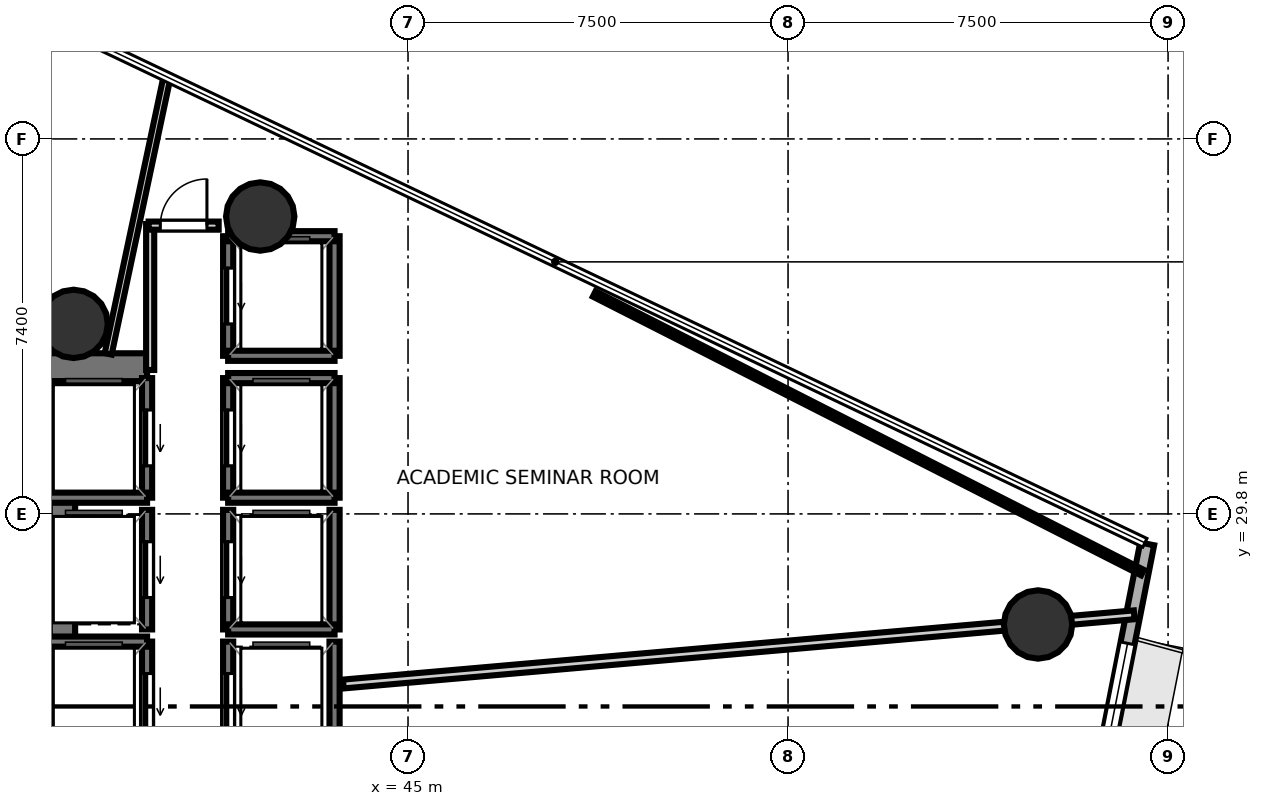
"""IFC4 building model, lengths in metres.
Left out: names, types, materials, properties, quantities, classifications, styles, units other than length and angle.
Written with IfcOpenShell. Run it as: python <this file> out.ifc"""

import sys

from ifc_helpers import new_model, si_unit, direction, frame, frame_2d, origin, origin_2d, place, context, subcontext, project, spatial, rectangle, hollow_circle, extrude, element, fill, save


model = new_model("IFC4")
c1 = context("Model", 3, precision=1e-05, world=origin(), true_north=direction((0.0, 1.0)))
c2 = subcontext(c1, "Body", "Model", "MODEL_VIEW")
j1 = project(units=[si_unit("LENGTHUNIT", "METRE"), si_unit("PLANEANGLEUNIT", "RADIAN")], contexts=[c1])
p1 = place(None, origin())
s1 = spatial("IfcSite", under=j1, at=p1, CompositionType="ELEMENT")
p2 = place(p1, origin())
s2 = spatial("IfcBuilding", under=s1, at=p2, CompositionType="ELEMENT")
p3 = place(p2, frame((0.0, 0.0, 143.1)))
s3 = spatial("IfcBuildingStorey", under=s2, at=p3, CompositionType="ELEMENT", Elevation=143.1)
p4 = place(p3, frame((29.23, 32.695, 0.0), z_axis=(0.0, 0.0, 1.0), x_axis=(1.0, 0.0, 0.0)))
e1 = element("IfcWall", 1, at=p4, inside=s3, PredefinedType="SHEAR", context=c2, shape_type="SweptSolid", body=[
    extrude(rectangle(XDim=10.62, YDim=0.55, at=frame_2d((5.31, 0.0))), origin(), (0.0, 0.0, 1.0), 4.32),
])
p5 = place(p4, frame((0.995, 0.0, 0.0)))
e2 = element("IfcOpeningElement", 2, at=p5, cuts=e1, PredefinedType="OPENING", context=c2, shape_type="SweptSolid", body=[
    extrude(rectangle(XDim=1.25, YDim=2.15, at=frame_2d((0.625, 1.075))), frame((0.0, 0.285, 0.0), z_axis=(0.0, -1.0, 0.0), x_axis=(1.0, 0.0, 0.0)), (0.0, 0.0, 1.0), 0.57),
])
p6 = place(p3, frame((38.18, 24.98, 0.0), z_axis=(0.0, 0.0, 1.0), x_axis=(0.0, 1.0, 0.0)))
e3 = element("IfcWall", 3, at=p6, inside=s3, PredefinedType="SHEAR", context=c2, shape_type="SweptSolid", body=[
    extrude(rectangle(XDim=7.44, YDim=0.5, at=frame_2d((3.72, 0.0))), origin(), (0.0, 0.0, 1.0), 4.32),
])
p7 = place(p3, frame((38.4, 33.55, 0.0), z_axis=(0.0, 0.0, 1.0), x_axis=(1.0, 0.0, 0.0)))
e4 = element("IfcColumn", 4, at=p7, inside=s3, PredefinedType="COLUMN", context=c2, shape_type="SweptSolid", body=[
    extrude(hollow_circle(Radius=0.675, WallThickness=0.032, at=origin_2d()), origin(), (0.0, 0.0, 1.0), 4.5),
])
for number, where, z_axis, x_axis in (
    (5, (57.434, 27.618, -0.27), (0.0, 0.0, 1.0), (1.0, 0.0, 0.0)),
    (6, (42.083, 35.669, -0.27), (0.0, 0.0, 1.0), (1.0, 0.0, 0.0)),
):
    element("IfcColumn", number, at=place(p3, frame(where, z_axis=z_axis, x_axis=x_axis)), inside=s3, PredefinedType="COLUMN", context=c2, shape_type="SweptSolid", body=[
        extrude(hollow_circle(Radius=0.675, WallThickness=0.032, at=origin_2d()), origin(), (0.0, 0.0, 1.0), 4.77),
    ])
p8 = place(p3, frame((58.035, 21.325, 0.0), z_axis=(0.0, 0.0, 1.0), x_axis=(0.193252046098, 0.981149145991, 0.0)))
e7 = element("IfcWall", 7, at=p8, inside=s3, PredefinedType="SOLIDWALL", context=c2, shape_type="SweptSolid", body=[
    extrude(rectangle(XDim=8.035, YDim=0.28, at=frame_2d((4.017, 0.0))), origin(), (0.0, 0.0, 1.0), 4.32),
])
p9 = place(p8, frame((1.36, 0.0, 0.85)))
e8 = element("IfcOpeningElement", 8, at=p9, cuts=e7, PredefinedType="OPENING", context=c2, shape_type="SweptSolid", body=[
    extrude(rectangle(XDim=2.1, YDim=2.2, at=frame_2d((1.05, 1.1))), frame((0.0, 0.15, 0.0), z_axis=(0.0, -1.0, 0.0), x_axis=(1.0, 0.0, 0.0)), (0.0, 0.0, 1.0), 0.3),
])
p10 = place(p8, frame((3.934, 0.0, 0.85)))
e9 = element("IfcOpeningElement", 9, at=p10, cuts=e7, PredefinedType="OPENING", context=c2, shape_type="SweptSolid", body=[
    extrude(rectangle(XDim=2.1, YDim=2.2, at=frame_2d((1.05, 1.1))), frame((0.0, 0.15, 0.0), z_axis=(0.0, -1.0, 0.0), x_axis=(1.0, 0.0, 0.0)), (0.0, 0.0, 1.0), 0.3),
])
p11 = place(p3, frame((29.7, 29.45, 0.0), z_axis=(0.0, 0.0, 1.0), x_axis=(1.0, 0.0, 0.0)))
e10 = element("IfcWall", 10, at=p11, inside=s3, PredefinedType="SOLIDWALL", context=c2, shape_type="SweptSolid", body=[
    extrude(rectangle(XDim=8.3, YDim=0.2, at=frame_2d((4.15, 0.0))), origin(), (0.0, 0.0, 1.0), 4.32),
])
p12 = place(p3, frame((39.85, 30.12, 0.0), z_axis=(0.0, 0.0, 1.0), x_axis=(0.0, 1.0, 0.0)))
e11 = element("IfcWall", 11, at=p12, inside=s3, PredefinedType="SOLIDWALL", context=c2, shape_type="SweptSolid", body=[
    extrude(rectangle(XDim=2.36, YDim=0.2, at=frame_2d((1.18, 0.0))), origin(), (0.0, 0.0, 1.0), 4.32),
])
p13 = place(p12, frame((0.63, 0.0, 0.0)))
e12 = element("IfcOpeningElement", 12, at=p13, cuts=e11, PredefinedType="OPENING", context=c2, shape_type="SweptSolid", body=[
    extrude(rectangle(XDim=1.1, YDim=2.15, at=frame_2d((0.55, 1.075))), frame((0.0, 0.11, 0.0), z_axis=(0.0, -1.0, 0.0), x_axis=(1.0, 0.0, 0.0)), (0.0, 0.0, 1.0), 0.22),
])
p14 = place(p3, frame((37.75, 30.12, 0.0), z_axis=(0.0, 0.0, 1.0), x_axis=(1.0, 0.0, 0.0)))
e13 = element("IfcWall", 13, at=p14, inside=s3, PredefinedType="SOLIDWALL", context=c2, shape_type="SweptSolid", body=[
    extrude(rectangle(XDim=2.1, YDim=0.2, at=frame_2d((1.05, 0.0))), origin(), (0.0, 0.0, 1.0), 4.32),
])
p15 = place(p3, frame((39.85, 24.92, 0.0), z_axis=(0.0, 0.0, 1.0), x_axis=(0.0, 1.0, 0.0)))
e14 = element("IfcWall", 14, at=p15, inside=s3, PredefinedType="SOLIDWALL", context=c2, shape_type="SweptSolid", body=[
    extrude(rectangle(XDim=2.36, YDim=0.2, at=frame_2d((1.18, 0.0))), origin(), (0.0, 0.0, 1.0), 4.32),
])
p16 = place(p15, frame((0.63, 0.0, 0.0)))
e15 = element("IfcOpeningElement", 15, at=p16, cuts=e14, PredefinedType="OPENING", context=c2, shape_type="SweptSolid", body=[
    extrude(rectangle(XDim=1.1, YDim=2.15, at=frame_2d((0.55, 1.075))), frame((0.0, 0.11, 0.0), z_axis=(0.0, -1.0, 0.0), x_axis=(1.0, 0.0, 0.0)), (0.0, 0.0, 1.0), 0.22),
])
p17 = place(p3, frame((37.75, 27.28, 0.0), z_axis=(0.0, 0.0, 1.0), x_axis=(1.0, 0.0, 0.0)))
e16 = element("IfcWall", 16, at=p17, inside=s3, PredefinedType="SOLIDWALL", context=c2, shape_type="SweptSolid", body=[
    extrude(rectangle(XDim=2.1, YDim=0.2, at=frame_2d((1.05, 0.0))), origin(), (0.0, 0.0, 1.0), 4.32),
])
p18 = place(p3, frame((43.55, 30.12, 0.0), z_axis=(0.0, 0.0, 1.0), x_axis=(0.0, 1.0, 0.0)))
e17 = element("IfcWall", 17, at=p18, inside=s3, PredefinedType="SOLIDWALL", context=c2, shape_type="SweptSolid", body=[
    extrude(rectangle(XDim=2.36, YDim=0.2, at=frame_2d((1.18, 0.0))), origin(), (0.0, 0.0, 1.0), 4.32),
])
p19 = place(p3, frame((41.45, 30.12, 0.0), z_axis=(0.0, 0.0, 1.0), x_axis=(0.0, 1.0, 0.0)))
e18 = element("IfcWall", 18, at=p19, inside=s3, PredefinedType="SOLIDWALL", context=c2, shape_type="SweptSolid", body=[
    extrude(rectangle(XDim=2.36, YDim=0.2, at=frame_2d((1.18, 0.0))), origin(), (0.0, 0.0, 1.0), 4.32),
])
p20 = place(p19, frame((0.63, 0.0, 0.0)))
e19 = element("IfcOpeningElement", 19, at=p20, cuts=e18, PredefinedType="OPENING", context=c2, shape_type="SweptSolid", body=[
    extrude(rectangle(XDim=1.1, YDim=2.15, at=frame_2d((0.55, 1.075))), frame((0.0, 0.11, 0.0), z_axis=(0.0, -1.0, 0.0), x_axis=(1.0, 0.0, 0.0)), (0.0, 0.0, 1.0), 0.22),
])
for number, where, z_axis, x_axis in (
    (20, (41.45, 32.48, 0.0), (0.0, 0.0, 1.0), (1.0, 0.0, 0.0)),
    (21, (41.45, 30.12, 0.0), (0.0, 0.0, 1.0), (1.0, 0.0, 0.0)),
):
    element("IfcWall", number, at=place(p3, frame(where, z_axis=z_axis, x_axis=x_axis)), inside=s3, PredefinedType="SOLIDWALL", context=c2, shape_type="SweptSolid", body=[
        extrude(rectangle(XDim=2.1, YDim=0.2, at=frame_2d((1.05, 0.0))), origin(), (0.0, 0.0, 1.0), 4.32),
    ])
p21 = place(p3, frame((43.55, 27.52, 0.0), z_axis=(0.0, 0.0, 1.0), x_axis=(0.0, 1.0, 0.0)))
e22 = element("IfcWall", 22, at=p21, inside=s3, PredefinedType="SOLIDWALL", context=c2, shape_type="SweptSolid", body=[
    extrude(rectangle(XDim=2.36, YDim=0.2, at=frame_2d((1.18, 0.0))), origin(), (0.0, 0.0, 1.0), 4.32),
])
p22 = place(p3, frame((41.45, 27.52, 0.0), z_axis=(0.0, 0.0, 1.0), x_axis=(0.0, 1.0, 0.0)))
e23 = element("IfcWall", 23, at=p22, inside=s3, PredefinedType="SOLIDWALL", context=c2, shape_type="SweptSolid", body=[
    extrude(rectangle(XDim=2.36, YDim=0.2, at=frame_2d((1.18, 0.0))), origin(), (0.0, 0.0, 1.0), 4.32),
])
p23 = place(p22, frame((0.63, 0.0, 0.0)))
e24 = element("IfcOpeningElement", 24, at=p23, cuts=e23, PredefinedType="OPENING", context=c2, shape_type="SweptSolid", body=[
    extrude(rectangle(XDim=1.1, YDim=2.15, at=frame_2d((0.55, 1.075))), frame((0.0, 0.11, 0.0), z_axis=(0.0, -1.0, 0.0), x_axis=(1.0, 0.0, 0.0)), (0.0, 0.0, 1.0), 0.22),
])
p24 = place(p3, frame((41.45, 27.52, 0.0), z_axis=(0.0, 0.0, 1.0), x_axis=(1.0, 0.0, 0.0)))
e25 = element("IfcWall", 25, at=p24, inside=s3, PredefinedType="SOLIDWALL", context=c2, shape_type="SweptSolid", body=[
    extrude(rectangle(XDim=2.1, YDim=0.2, at=frame_2d((1.05, 0.0))), origin(), (0.0, 0.0, 1.0), 4.32),
])
p25 = place(p3, frame((43.55, 24.92, 0.0), z_axis=(0.0, 0.0, 1.0), x_axis=(0.0, 1.0, 0.0)))
e26 = element("IfcWall", 26, at=p25, inside=s3, PredefinedType="SOLIDWALL", context=c2, shape_type="SweptSolid", body=[
    extrude(rectangle(XDim=2.36, YDim=0.2, at=frame_2d((1.18, 0.0))), origin(), (0.0, 0.0, 1.0), 4.32),
])
p26 = place(p3, frame((41.45, 24.92, 0.0), z_axis=(0.0, 0.0, 1.0), x_axis=(0.0, 1.0, 0.0)))
e27 = element("IfcWall", 27, at=p26, inside=s3, PredefinedType="SOLIDWALL", context=c2, shape_type="SweptSolid", body=[
    extrude(rectangle(XDim=2.36, YDim=0.2, at=frame_2d((1.18, 0.0))), origin(), (0.0, 0.0, 1.0), 4.32),
])
p27 = place(p26, frame((0.63, 0.0, 0.0)))
e28 = element("IfcOpeningElement", 28, at=p27, cuts=e27, PredefinedType="OPENING", context=c2, shape_type="SweptSolid", body=[
    extrude(rectangle(XDim=1.1, YDim=2.15, at=frame_2d((0.55, 1.075))), frame((0.0, 0.11, 0.0), z_axis=(0.0, -1.0, 0.0), x_axis=(1.0, 0.0, 0.0)), (0.0, 0.0, 1.0), 0.22),
])
p28 = place(p3, frame((39.85, 27.52, 0.0), z_axis=(0.0, 0.0, 1.0), x_axis=(0.0, 1.0, 0.0)))
e29 = element("IfcWall", 29, at=p28, inside=s3, PredefinedType="SOLIDWALL", context=c2, shape_type="SweptSolid", body=[
    extrude(rectangle(XDim=2.36, YDim=0.2, at=frame_2d((1.18, 0.0))), origin(), (0.0, 0.0, 1.0), 4.32),
])
p29 = place(p28, frame((0.63, 0.0, 0.0)))
e30 = element("IfcOpeningElement", 30, at=p29, cuts=e29, PredefinedType="OPENING", context=c2, shape_type="SweptSolid", body=[
    extrude(rectangle(XDim=1.1, YDim=2.15, at=frame_2d((0.55, 1.075))), frame((0.0, 0.11, 0.0), z_axis=(0.0, -1.0, 0.0), x_axis=(1.0, 0.0, 0.0)), (0.0, 0.0, 1.0), 0.22),
])
p30 = place(p3, frame((43.55, 32.92, 0.0), z_axis=(0.0, 0.0, 1.0), x_axis=(0.0, 1.0, 0.0)))
e31 = element("IfcWall", 31, at=p30, inside=s3, PredefinedType="SOLIDWALL", context=c2, shape_type="SweptSolid", body=[
    extrude(rectangle(XDim=2.36, YDim=0.2, at=frame_2d((1.18, 0.0))), origin(), (0.0, 0.0, 1.0), 4.32),
])
p31 = place(p3, frame((41.45, 32.92, 0.0), z_axis=(0.0, 0.0, 1.0), x_axis=(0.0, 1.0, 0.0)))
e32 = element("IfcWall", 32, at=p31, inside=s3, PredefinedType="SOLIDWALL", context=c2, shape_type="SweptSolid", body=[
    extrude(rectangle(XDim=2.36, YDim=0.2, at=frame_2d((1.18, 0.0))), origin(), (0.0, 0.0, 1.0), 4.32),
])
p32 = place(p31, frame((0.63, 0.0, 0.0)))
e33 = element("IfcOpeningElement", 33, at=p32, cuts=e32, PredefinedType="OPENING", context=c2, shape_type="SweptSolid", body=[
    extrude(rectangle(XDim=1.1, YDim=2.15, at=frame_2d((0.55, 1.075))), frame((0.0, 0.11, 0.0), z_axis=(0.0, -1.0, 0.0), x_axis=(1.0, 0.0, 0.0)), (0.0, 0.0, 1.0), 0.22),
])
for number, where, z_axis, x_axis in (
    (34, (41.45, 35.28, 0.0), (0.0, 0.0, 1.0), (1.0, 0.0, 0.0)),
    (35, (41.45, 32.92, 0.0), (0.0, 0.0, 1.0), (1.0, 0.0, 0.0)),
):
    element("IfcWall", number, at=place(p3, frame(where, z_axis=z_axis, x_axis=x_axis)), inside=s3, PredefinedType="SOLIDWALL", context=c2, shape_type="SweptSolid", body=[
        extrude(rectangle(XDim=2.1, YDim=0.2, at=frame_2d((1.05, 0.0))), origin(), (0.0, 0.0, 1.0), 4.32),
    ])
p33 = place(p3, frame((39.911, 32.64, 0.0), z_axis=(0.0, 0.0, 1.0), x_axis=(0.0, 1.0, 0.0)))
e36 = element("IfcWall", 36, at=p33, inside=s3, PredefinedType="PARTITIONING", context=c2, shape_type="SweptSolid", body=[
    extrude(rectangle(XDim=2.88, YDim=0.16, at=frame_2d((1.44, 0.0))), origin(), (0.0, 0.0, 1.0), 3.64),
])
p34 = place(p3, frame((39.88, 35.489, 0.0), z_axis=(0.0, 0.0, 1.0), x_axis=(1.0, 0.0, 0.0)))
e37 = element("IfcWall", 37, at=p34, inside=s3, PredefinedType="PARTITIONING", context=c2, shape_type="SweptSolid", body=[
    extrude(rectangle(XDim=1.383, YDim=0.16, at=frame_2d((0.691, 0.0))), origin(), (0.0, 0.0, 1.0), 3.64),
])
p35 = place(p34, frame((0.231, 0.0, 0.0)))
e38 = element("IfcOpeningElement", 38, at=p35, cuts=e37, PredefinedType="OPENING", context=c2, shape_type="SweptSolid", body=[
    extrude(rectangle(XDim=0.92, YDim=2.1, at=frame_2d((0.46, 1.05))), frame((0.0, 0.09, 0.0), z_axis=(0.0, -1.0, 0.0), x_axis=(1.0, 0.0, 0.0)), (0.0, 0.0, 1.0), 0.18),
])
p36 = place(p3, frame((43.723, 26.443, 0.0), z_axis=(0.0, 0.0, 1.0), x_axis=(0.996195256439, 0.087149360569, 0.0)))
e39 = element("IfcWall", 39, at=p36, inside=s3, PredefinedType="PLUMBINGWALL", context=c2, shape_type="SweptSolid", body=[
    extrude(rectangle(XDim=15.668, YDim=0.175, at=frame_2d((7.834, 0.0))), origin(), (0.0, 0.0, 1.0), 3.64),
])
p37 = place(p3, frame((39.082, 32.958, 0.0), z_axis=(0.0, 0.0, 1.0), x_axis=(0.207932173696, 0.978143246739, 0.0)))
e40 = element("IfcWall", 40, at=p37, inside=s3, PredefinedType="PARTITIONING", context=c2, shape_type="SweptSolid", body=[
    extrude(rectangle(XDim=5.608, YDim=0.14, at=frame_2d((2.804, 0.0))), origin(), (0.0, 0.0, 1.0), 3.64),
])
p38 = place(p3, frame((48.675, 34.141, 0.0), z_axis=(0.0, 0.0, 1.0), x_axis=(0.891467205554, -0.45308522534, 0.0)))
e41 = element("IfcWall", 41, at=p38, inside=s3, PredefinedType="PARTITIONING", context=c2, shape_type="SweptSolid", body=[
    extrude(rectangle(XDim=12.138, YDim=0.12, at=frame_2d((6.069, 0.0))), origin(), (0.0, 0.0, 1.0), 3.64),
])
p39 = place(p13, origin())
e42 = element("IfcDoor", 42, at=p39, inside=s3, OperationType="SLIDING_TO_LEFT", PredefinedType="DOOR", context=c2, shape_type="SweptSolid", body=[
    extrude(rectangle(XDim=1.1, YDim=2.15, at=frame_2d((0.55, 1.075))), frame((0.0, 0.025, 0.0), z_axis=(0.0, -1.0, 0.0), x_axis=(1.0, 0.0, 0.0)), (0.0, 0.0, 1.0), 0.05),
])
fill(e12, e42)
p40 = place(p16, origin())
e43 = element("IfcDoor", 43, at=p40, inside=s3, OperationType="SLIDING_TO_LEFT", PredefinedType="DOOR", context=c2, shape_type="SweptSolid", body=[
    extrude(rectangle(XDim=1.1, YDim=2.15, at=frame_2d((0.55, 1.075))), frame((0.0, 0.025, 0.0), z_axis=(0.0, -1.0, 0.0), x_axis=(1.0, 0.0, 0.0)), (0.0, 0.0, 1.0), 0.05),
])
fill(e15, e43)
p41 = place(p20, origin())
e44 = element("IfcDoor", 44, at=p41, inside=s3, OperationType="SLIDING_TO_LEFT", PredefinedType="DOOR", context=c2, shape_type="SweptSolid", body=[
    extrude(rectangle(XDim=1.1, YDim=2.15, at=frame_2d((0.55, 1.075))), frame((0.0, 0.025, 0.0), z_axis=(0.0, -1.0, 0.0), x_axis=(1.0, 0.0, 0.0)), (0.0, 0.0, 1.0), 0.05),
])
fill(e19, e44)
p42 = place(p23, origin())
e45 = element("IfcDoor", 45, at=p42, inside=s3, OperationType="SLIDING_TO_LEFT", PredefinedType="DOOR", context=c2, shape_type="SweptSolid", body=[
    extrude(rectangle(XDim=1.1, YDim=2.15, at=frame_2d((0.55, 1.075))), frame((0.0, 0.025, 0.0), z_axis=(0.0, -1.0, 0.0), x_axis=(1.0, 0.0, 0.0)), (0.0, 0.0, 1.0), 0.05),
])
fill(e24, e45)
p43 = place(p27, origin())
e46 = element("IfcDoor", 46, at=p43, inside=s3, OperationType="SLIDING_TO_LEFT", PredefinedType="DOOR", context=c2, shape_type="SweptSolid", body=[
    extrude(rectangle(XDim=1.1, YDim=2.15, at=frame_2d((0.55, 1.075))), frame((0.0, 0.025, 0.0), z_axis=(0.0, -1.0, 0.0), x_axis=(1.0, 0.0, 0.0)), (0.0, 0.0, 1.0), 0.05),
])
fill(e28, e46)
p44 = place(p29, origin())
e47 = element("IfcDoor", 47, at=p44, inside=s3, OperationType="SLIDING_TO_LEFT", PredefinedType="DOOR", context=c2, shape_type="SweptSolid", body=[
    extrude(rectangle(XDim=1.1, YDim=2.15, at=frame_2d((0.55, 1.075))), frame((0.0, 0.025, 0.0), z_axis=(0.0, -1.0, 0.0), x_axis=(1.0, 0.0, 0.0)), (0.0, 0.0, 1.0), 0.05),
])
fill(e30, e47)
p45 = place(p32, origin())
e48 = element("IfcDoor", 48, at=p45, inside=s3, OperationType="SLIDING_TO_LEFT", PredefinedType="DOOR", context=c2, shape_type="SweptSolid", body=[
    extrude(rectangle(XDim=1.1, YDim=2.15, at=frame_2d((0.55, 1.075))), frame((0.0, 0.025, 0.0), z_axis=(0.0, -1.0, 0.0), x_axis=(1.0, 0.0, 0.0)), (0.0, 0.0, 1.0), 0.05),
])
fill(e33, e48)
p46 = place(p35, origin())
e49 = element("IfcDoor", 49, at=p46, inside=s3, OperationType="SINGLE_SWING_RIGHT", PredefinedType="DOOR", context=c2, shape_type="SweptSolid", body=[
    extrude(rectangle(XDim=0.92, YDim=2.1, at=frame_2d((0.46, 1.05))), frame((0.0, 0.025, 0.0), z_axis=(0.0, -1.0, 0.0), x_axis=(1.0, 0.0, 0.0)), (0.0, 0.0, 1.0), 0.05),
])
fill(e38, e49)
p47 = place(p10, origin())
e50 = element("IfcWindow", 50, at=p47, inside=s3, PartitioningType="SINGLE_PANEL", PredefinedType="WINDOW", context=c2, shape_type="SweptSolid", body=[
    extrude(rectangle(XDim=2.1, YDim=2.2, at=frame_2d((1.05, 1.1))), frame((0.0, 0.03, 0.0), z_axis=(0.0, -1.0, 0.0), x_axis=(1.0, 0.0, 0.0)), (0.0, 0.0, 1.0), 0.06),
])
fill(e9, e50)
save(model, sys.argv[1])
